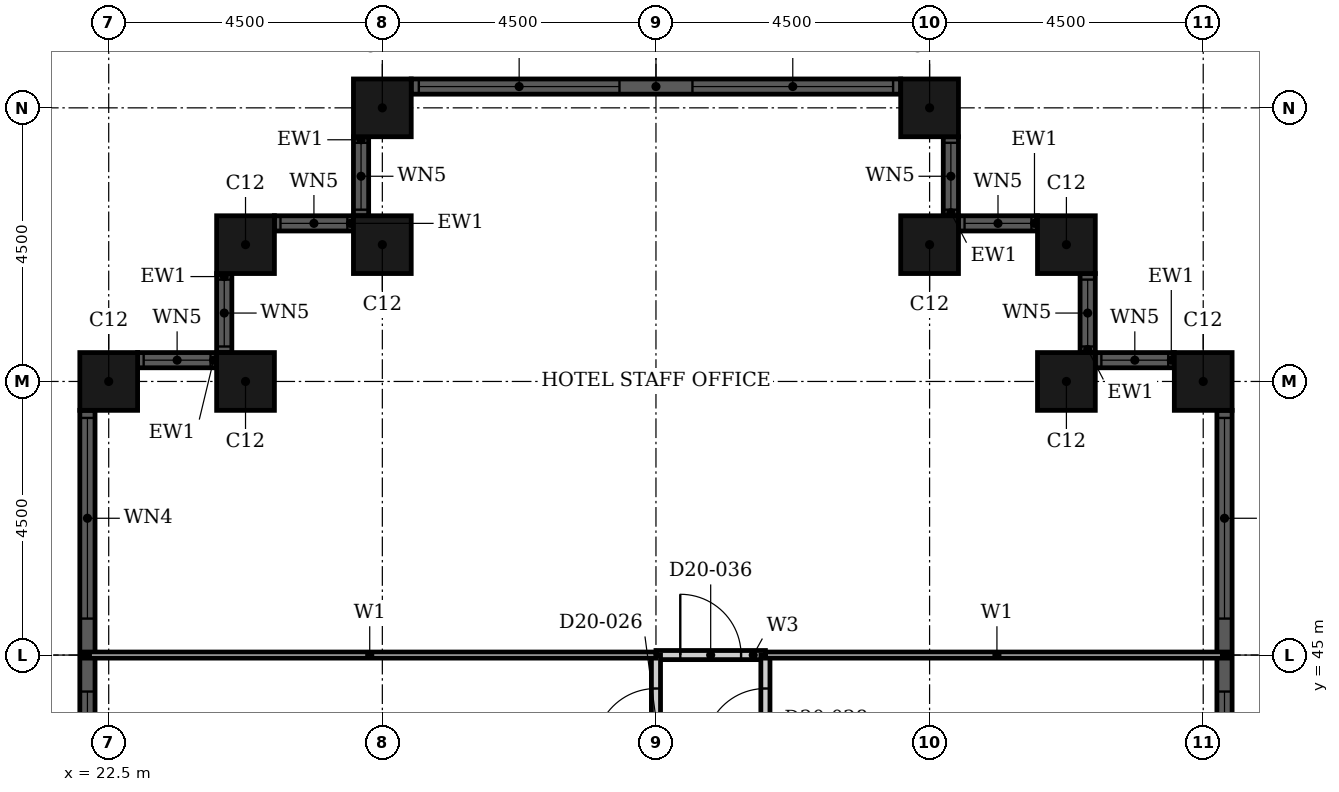
"""IFC4 building model, lengths in metres.
Left out: names, types, materials, properties, quantities, classifications, styles, units other than length and angle.
Written with IfcOpenShell. Run it as: python <this file> out.ifc"""

import sys

from ifc_helpers import new_model, si_unit, direction, frame, frame_2d, origin, origin_2d, place, context, subcontext, project, spatial, rectangle, hollow_rectangle, extrude, element, fill, save


model = new_model("IFC4")
c1 = context("Model", 3, precision=1e-05, world=origin(), true_north=direction((0.0, 1.0)))
c2 = subcontext(c1, "Body", "Model", "MODEL_VIEW")
j1 = project(units=[si_unit("LENGTHUNIT", "METRE"), si_unit("PLANEANGLEUNIT", "RADIAN")], contexts=[c1])
p1 = place(None, origin())
s1 = spatial("IfcSite", under=j1, at=p1, CompositionType="ELEMENT")
p2 = place(p1, origin())
s2 = spatial("IfcBuilding", under=s1, at=p2, CompositionType="ELEMENT")
p3 = place(p2, frame((0.0, 0.0, 85.2)))
s3 = spatial("IfcBuildingStorey", under=s2, at=p3, CompositionType="ELEMENT", Elevation=85.2)
for number, where, z_axis, x_axis in (
    (1, (40.5, 49.5, 0.0), (0.0, 0.0, 1.0), (1.0, 0.0, 0.0)),
    (2, (38.25, 49.5, 0.0), (0.0, 0.0, 1.0), (1.0, 0.0, 0.0)),
    (3, (38.25, 51.75, 0.0), (0.0, 0.0, 1.0), (1.0, 0.0, 0.0)),
    (4, (36.0, 51.75, 0.0), (0.0, 0.0, 1.0), (1.0, 0.0, 0.0)),
    (5, (36.0, 54.0, 0.0), (0.0, 0.0, 1.0), (1.0, 0.0, 0.0)),
    (6, (27.0, 54.0, 0.0), (0.0, 0.0, 1.0), (1.0, 0.0, 0.0)),
    (7, (27.0, 51.75, 0.0), (0.0, 0.0, 1.0), (1.0, 0.0, 0.0)),
    (8, (24.75, 51.75, 0.0), (0.0, 0.0, 1.0), (1.0, 0.0, 0.0)),
    (9, (24.75, 49.5, 0.0), (0.0, 0.0, 1.0), (1.0, 0.0, 0.0)),
    (10, (22.5, 49.5, 0.0), (0.0, 0.0, 1.0), (1.0, 0.0, 0.0)),
):
    element("IfcColumn", number, at=place(p3, frame(where, z_axis=z_axis, x_axis=x_axis)), inside=s3, PredefinedType="COLUMN", context=c2, shape_type="SweptSolid", body=[
        extrude(hollow_rectangle(XDim=0.95, YDim=0.95, WallThickness=0.03, at=origin_2d()), origin(), (0.0, 0.0, 1.0), 3.6),
    ])
p4 = place(p3, frame((40.85, 40.975, 0.0), z_axis=(0.0, 0.0, 1.0), x_axis=(0.0, 1.0, 0.0)))
e11 = element("IfcWall", 11, at=p4, inside=s3, PredefinedType="SOLIDWALL", context=c2, shape_type="SweptSolid", body=[
    extrude(rectangle(XDim=8.05, YDim=0.25, at=frame_2d((4.025, 0.0))), origin(), (0.0, 0.0, 1.0), 3.6),
])
p5 = place(p4, frame((0.125, 0.0, 0.9)))
e12 = element("IfcOpeningElement", 12, at=p5, cuts=e11, PredefinedType="OPENING", context=c2, shape_type="SweptSolid", body=[
    extrude(rectangle(XDim=3.3, YDim=2.08, at=frame_2d((1.65, 1.04))), frame((0.0, 0.135, 0.0), z_axis=(0.0, -1.0, 0.0), x_axis=(1.0, 0.0, 0.0)), (0.0, 0.0, 1.0), 0.27),
])
p6 = place(p4, frame((4.625, 0.0, 0.9)))
e13 = element("IfcOpeningElement", 13, at=p6, cuts=e11, PredefinedType="OPENING", context=c2, shape_type="SweptSolid", body=[
    extrude(rectangle(XDim=3.3, YDim=2.08, at=frame_2d((1.65, 1.04))), frame((0.0, 0.135, 0.0), z_axis=(0.0, -1.0, 0.0), x_axis=(1.0, 0.0, 0.0)), (0.0, 0.0, 1.0), 0.27),
])
p7 = place(p3, frame((40.025, 49.85, 0.0), z_axis=(0.0, 0.0, 1.0), x_axis=(-1.0, 0.0, 0.0)))
e14 = element("IfcWall", 14, at=p7, inside=s3, PredefinedType="SOLIDWALL", context=c2, shape_type="SweptSolid", body=[
    extrude(rectangle(XDim=1.3, YDim=0.25, at=frame_2d((0.65, 0.0))), origin(), (0.0, 0.0, 1.0), 3.6),
])
p8 = place(p7, frame((0.1, 0.0, 0.9)))
e15 = element("IfcOpeningElement", 15, at=p8, cuts=e14, PredefinedType="OPENING", context=c2, shape_type="SweptSolid", body=[
    extrude(rectangle(XDim=1.1, YDim=2.08, at=frame_2d((0.55, 1.04))), frame((0.0, 0.135, 0.0), z_axis=(0.0, -1.0, 0.0), x_axis=(1.0, 0.0, 0.0)), (0.0, 0.0, 1.0), 0.27),
])
p9 = place(p3, frame((38.6, 49.975, 0.0), z_axis=(0.0, 0.0, 1.0), x_axis=(0.0, 1.0, 0.0)))
e16 = element("IfcWall", 16, at=p9, inside=s3, PredefinedType="SOLIDWALL", context=c2, shape_type="SweptSolid", body=[
    extrude(rectangle(XDim=1.3, YDim=0.25, at=frame_2d((0.65, 0.0))), origin(), (0.0, 0.0, 1.0), 3.6),
])
p10 = place(p9, frame((0.1, 0.0, 0.9)))
e17 = element("IfcOpeningElement", 17, at=p10, cuts=e16, PredefinedType="OPENING", context=c2, shape_type="SweptSolid", body=[
    extrude(rectangle(XDim=1.1, YDim=2.08, at=frame_2d((0.55, 1.04))), frame((0.0, 0.135, 0.0), z_axis=(0.0, -1.0, 0.0), x_axis=(1.0, 0.0, 0.0)), (0.0, 0.0, 1.0), 0.27),
])
p11 = place(p3, frame((37.775, 52.1, 0.0), z_axis=(0.0, 0.0, 1.0), x_axis=(-1.0, 0.0, 0.0)))
e18 = element("IfcWall", 18, at=p11, inside=s3, PredefinedType="SOLIDWALL", context=c2, shape_type="SweptSolid", body=[
    extrude(rectangle(XDim=1.3, YDim=0.25, at=frame_2d((0.65, 0.0))), origin(), (0.0, 0.0, 1.0), 3.6),
])
p12 = place(p11, frame((0.1, 0.0, 0.9)))
e19 = element("IfcOpeningElement", 19, at=p12, cuts=e18, PredefinedType="OPENING", context=c2, shape_type="SweptSolid", body=[
    extrude(rectangle(XDim=1.1, YDim=2.08, at=frame_2d((0.55, 1.04))), frame((0.0, 0.135, 0.0), z_axis=(0.0, -1.0, 0.0), x_axis=(1.0, 0.0, 0.0)), (0.0, 0.0, 1.0), 0.27),
])
p13 = place(p3, frame((36.35, 52.225, 0.0), z_axis=(0.0, 0.0, 1.0), x_axis=(0.0, 1.0, 0.0)))
e20 = element("IfcWall", 20, at=p13, inside=s3, PredefinedType="SOLIDWALL", context=c2, shape_type="SweptSolid", body=[
    extrude(rectangle(XDim=1.3, YDim=0.25, at=frame_2d((0.65, 0.0))), origin(), (0.0, 0.0, 1.0), 3.6),
])
p14 = place(p13, frame((0.1, 0.0, 0.9)))
e21 = element("IfcOpeningElement", 21, at=p14, cuts=e20, PredefinedType="OPENING", context=c2, shape_type="SweptSolid", body=[
    extrude(rectangle(XDim=1.1, YDim=2.08, at=frame_2d((0.55, 1.04))), frame((0.0, 0.135, 0.0), z_axis=(0.0, -1.0, 0.0), x_axis=(1.0, 0.0, 0.0)), (0.0, 0.0, 1.0), 0.27),
])
p15 = place(p3, frame((35.525, 54.35, 0.0), z_axis=(0.0, 0.0, 1.0), x_axis=(-1.0, 0.0, 0.0)))
e22 = element("IfcWall", 22, at=p15, inside=s3, PredefinedType="SOLIDWALL", context=c2, shape_type="SweptSolid", body=[
    extrude(rectangle(XDim=8.05, YDim=0.25, at=frame_2d((4.025, 0.0))), origin(), (0.0, 0.0, 1.0), 3.6),
])
p16 = place(p15, frame((0.125, 0.0, 0.9)))
e23 = element("IfcOpeningElement", 23, at=p16, cuts=e22, PredefinedType="OPENING", context=c2, shape_type="SweptSolid", body=[
    extrude(rectangle(XDim=3.3, YDim=2.08, at=frame_2d((1.65, 1.04))), frame((0.0, 0.135, 0.0), z_axis=(0.0, -1.0, 0.0), x_axis=(1.0, 0.0, 0.0)), (0.0, 0.0, 1.0), 0.27),
])
p17 = place(p15, frame((4.625, 0.0, 0.9)))
e24 = element("IfcOpeningElement", 24, at=p17, cuts=e22, PredefinedType="OPENING", context=c2, shape_type="SweptSolid", body=[
    extrude(rectangle(XDim=3.3, YDim=2.08, at=frame_2d((1.65, 1.04))), frame((0.0, 0.135, 0.0), z_axis=(0.0, -1.0, 0.0), x_axis=(1.0, 0.0, 0.0)), (0.0, 0.0, 1.0), 0.27),
])
p18 = place(p3, frame((26.65, 53.525, 0.0), z_axis=(0.0, 0.0, 1.0), x_axis=(0.0, -1.0, 0.0)))
e25 = element("IfcWall", 25, at=p18, inside=s3, PredefinedType="SOLIDWALL", context=c2, shape_type="SweptSolid", body=[
    extrude(rectangle(XDim=1.3, YDim=0.25, at=frame_2d((0.65, 0.0))), origin(), (0.0, 0.0, 1.0), 3.6),
])
p19 = place(p18, frame((0.1, 0.0, 0.9)))
e26 = element("IfcOpeningElement", 26, at=p19, cuts=e25, PredefinedType="OPENING", context=c2, shape_type="SweptSolid", body=[
    extrude(rectangle(XDim=1.1, YDim=2.08, at=frame_2d((0.55, 1.04))), frame((0.0, 0.135, 0.0), z_axis=(0.0, -1.0, 0.0), x_axis=(1.0, 0.0, 0.0)), (0.0, 0.0, 1.0), 0.27),
])
p20 = place(p3, frame((26.525, 52.1, 0.0), z_axis=(0.0, 0.0, 1.0), x_axis=(-1.0, 0.0, 0.0)))
e27 = element("IfcWall", 27, at=p20, inside=s3, PredefinedType="SOLIDWALL", context=c2, shape_type="SweptSolid", body=[
    extrude(rectangle(XDim=1.3, YDim=0.25, at=frame_2d((0.65, 0.0))), origin(), (0.0, 0.0, 1.0), 3.6),
])
p21 = place(p20, frame((0.1, 0.0, 0.9)))
e28 = element("IfcOpeningElement", 28, at=p21, cuts=e27, PredefinedType="OPENING", context=c2, shape_type="SweptSolid", body=[
    extrude(rectangle(XDim=1.1, YDim=2.08, at=frame_2d((0.55, 1.04))), frame((0.0, 0.135, 0.0), z_axis=(0.0, -1.0, 0.0), x_axis=(1.0, 0.0, 0.0)), (0.0, 0.0, 1.0), 0.27),
])
p22 = place(p3, frame((24.4, 51.275, 0.0), z_axis=(0.0, 0.0, 1.0), x_axis=(0.0, -1.0, 0.0)))
e29 = element("IfcWall", 29, at=p22, inside=s3, PredefinedType="SOLIDWALL", context=c2, shape_type="SweptSolid", body=[
    extrude(rectangle(XDim=1.3, YDim=0.25, at=frame_2d((0.65, 0.0))), origin(), (0.0, 0.0, 1.0), 3.6),
])
p23 = place(p22, frame((0.1, 0.0, 0.9)))
e30 = element("IfcOpeningElement", 30, at=p23, cuts=e29, PredefinedType="OPENING", context=c2, shape_type="SweptSolid", body=[
    extrude(rectangle(XDim=1.1, YDim=2.08, at=frame_2d((0.55, 1.04))), frame((0.0, 0.135, 0.0), z_axis=(0.0, -1.0, 0.0), x_axis=(1.0, 0.0, 0.0)), (0.0, 0.0, 1.0), 0.27),
])
p24 = place(p3, frame((24.275, 49.85, 0.0), z_axis=(0.0, 0.0, 1.0), x_axis=(-1.0, 0.0, 0.0)))
e31 = element("IfcWall", 31, at=p24, inside=s3, PredefinedType="SOLIDWALL", context=c2, shape_type="SweptSolid", body=[
    extrude(rectangle(XDim=1.3, YDim=0.25, at=frame_2d((0.65, 0.0))), origin(), (0.0, 0.0, 1.0), 3.6),
])
p25 = place(p24, frame((0.1, 0.0, 0.9)))
e32 = element("IfcOpeningElement", 32, at=p25, cuts=e31, PredefinedType="OPENING", context=c2, shape_type="SweptSolid", body=[
    extrude(rectangle(XDim=1.1, YDim=2.08, at=frame_2d((0.55, 1.04))), frame((0.0, 0.135, 0.0), z_axis=(0.0, -1.0, 0.0), x_axis=(1.0, 0.0, 0.0)), (0.0, 0.0, 1.0), 0.27),
])
p26 = place(p3, frame((22.15, 49.025, 0.0), z_axis=(0.0, 0.0, 1.0), x_axis=(0.0, -1.0, 0.0)))
e33 = element("IfcWall", 33, at=p26, inside=s3, PredefinedType="SOLIDWALL", context=c2, shape_type="SweptSolid", body=[
    extrude(rectangle(XDim=8.05, YDim=0.25, at=frame_2d((4.025, 0.0))), origin(), (0.0, 0.0, 1.0), 3.6),
])
p27 = place(p26, frame((0.125, 0.0, 0.9)))
e34 = element("IfcOpeningElement", 34, at=p27, cuts=e33, PredefinedType="OPENING", context=c2, shape_type="SweptSolid", body=[
    extrude(rectangle(XDim=3.3, YDim=2.08, at=frame_2d((1.65, 1.04))), frame((0.0, 0.135, 0.0), z_axis=(0.0, -1.0, 0.0), x_axis=(1.0, 0.0, 0.0)), (0.0, 0.0, 1.0), 0.27),
])
p28 = place(p26, frame((4.625, 0.0, 0.9)))
e35 = element("IfcOpeningElement", 35, at=p28, cuts=e33, PredefinedType="OPENING", context=c2, shape_type="SweptSolid", body=[
    extrude(rectangle(XDim=3.3, YDim=2.08, at=frame_2d((1.65, 1.04))), frame((0.0, 0.135, 0.0), z_axis=(0.0, -1.0, 0.0), x_axis=(1.0, 0.0, 0.0)), (0.0, 0.0, 1.0), 0.27),
])
p29 = place(p3, frame((31.5, 45.0, 0.0), z_axis=(0.0, 0.0, 1.0), x_axis=(1.0, 0.0, 0.0)))
e36 = element("IfcWall", 36, at=p29, inside=s3, PredefinedType="PARTITIONING", context=c2, shape_type="SweptSolid", body=[
    extrude(rectangle(XDim=1.8, YDim=0.15, at=frame_2d((0.9, 0.0))), origin(), (0.0, 0.0, 1.0), 3.3),
])
p30 = place(p29, frame((0.4, 0.0, 0.0)))
e37 = element("IfcOpeningElement", 37, at=p30, cuts=e36, PredefinedType="OPENING", context=c2, shape_type="SweptSolid", body=[
    extrude(rectangle(XDim=1.0, YDim=2.1, at=frame_2d((0.5, 1.05))), frame((0.0, 0.085, 0.0), z_axis=(0.0, -1.0, 0.0), x_axis=(1.0, 0.0, 0.0)), (0.0, 0.0, 1.0), 0.17),
])
p31 = place(p3, frame((31.5, 33.3, 0.0), z_axis=(0.0, 0.0, 1.0), x_axis=(0.0, 1.0, 0.0)))
e38 = element("IfcWall", 38, at=p31, inside=s3, PredefinedType="PARTITIONING", context=c2, shape_type="SweptSolid", body=[
    extrude(rectangle(XDim=11.7, YDim=0.15, at=frame_2d((5.85, 0.0))), origin(), (0.0, 0.0, 1.0), 2.58),
])
p32 = place(p31, frame((10.15, 0.0, 0.0)))
e39 = element("IfcOpeningElement", 39, at=p32, cuts=e38, PredefinedType="OPENING", context=c2, shape_type="SweptSolid", body=[
    extrude(rectangle(XDim=1.0, YDim=2.1, at=frame_2d((0.5, 1.05))), frame((0.0, 0.085, 0.0), z_axis=(0.0, -1.0, 0.0), x_axis=(1.0, 0.0, 0.0)), (0.0, 0.0, 1.0), 0.17),
])
p33 = place(p3, frame((33.3, 33.3, 0.0), z_axis=(0.0, 0.0, 1.0), x_axis=(0.0, 1.0, 0.0)))
e40 = element("IfcWall", 40, at=p33, inside=s3, PredefinedType="PARTITIONING", context=c2, shape_type="SweptSolid", body=[
    extrude(rectangle(XDim=11.7, YDim=0.15, at=frame_2d((5.85, 0.0))), origin(), (0.0, 0.0, 1.0), 3.3),
])
p34 = place(p33, frame((10.15, 0.0, 0.0)))
e41 = element("IfcOpeningElement", 41, at=p34, cuts=e40, PredefinedType="OPENING", context=c2, shape_type="SweptSolid", body=[
    extrude(rectangle(XDim=1.0, YDim=2.1, at=frame_2d((0.5, 1.05))), frame((0.0, 0.085, 0.0), z_axis=(0.0, -1.0, 0.0), x_axis=(1.0, 0.0, 0.0)), (0.0, 0.0, 1.0), 0.17),
])
p35 = place(p3, frame((33.3, 45.0, 0.0), z_axis=(0.0, 0.0, 1.0), x_axis=(1.0, 0.0, 0.0)))
e42 = element("IfcWall", 42, at=p35, inside=s3, PredefinedType="PARTITIONING", context=c2, shape_type="SweptSolid", body=[
    extrude(rectangle(XDim=7.615, YDim=0.1, at=frame_2d((3.808, 0.0))), origin(), (0.0, 0.0, 1.0), 3.3),
])
p36 = place(p3, frame((22.085, 45.0, 0.0), z_axis=(0.0, 0.0, 1.0), x_axis=(1.0, 0.0, 0.0)))
e43 = element("IfcWall", 43, at=p36, inside=s3, PredefinedType="PARTITIONING", context=c2, shape_type="SweptSolid", body=[
    extrude(rectangle(XDim=9.415, YDim=0.1, at=frame_2d((4.708, 0.0))), origin(), (0.0, 0.0, 1.0), 3.3),
])
p37 = place(p5, origin())
e44 = element("IfcWindow", 44, at=p37, inside=s3, PartitioningType="SINGLE_PANEL", PredefinedType="WINDOW", context=c2, shape_type="SweptSolid", body=[
    extrude(rectangle(XDim=3.3, YDim=2.08, at=frame_2d((1.65, 1.04))), frame((0.0, 0.03, 0.0), z_axis=(0.0, -1.0, 0.0), x_axis=(1.0, 0.0, 0.0)), (0.0, 0.0, 1.0), 0.06),
])
fill(e12, e44)
p38 = place(p6, origin())
e45 = element("IfcWindow", 45, at=p38, inside=s3, PartitioningType="SINGLE_PANEL", PredefinedType="WINDOW", context=c2, shape_type="SweptSolid", body=[
    extrude(rectangle(XDim=3.3, YDim=2.08, at=frame_2d((1.65, 1.04))), frame((0.0, 0.03, 0.0), z_axis=(0.0, -1.0, 0.0), x_axis=(1.0, 0.0, 0.0)), (0.0, 0.0, 1.0), 0.06),
])
fill(e13, e45)
p39 = place(p8, origin())
e46 = element("IfcWindow", 46, at=p39, inside=s3, PartitioningType="SINGLE_PANEL", PredefinedType="WINDOW", context=c2, shape_type="SweptSolid", body=[
    extrude(rectangle(XDim=1.1, YDim=2.08, at=frame_2d((0.55, 1.04))), frame((0.0, 0.03, 0.0), z_axis=(0.0, -1.0, 0.0), x_axis=(1.0, 0.0, 0.0)), (0.0, 0.0, 1.0), 0.06),
])
fill(e15, e46)
p40 = place(p10, origin())
e47 = element("IfcWindow", 47, at=p40, inside=s3, PartitioningType="SINGLE_PANEL", PredefinedType="WINDOW", context=c2, shape_type="SweptSolid", body=[
    extrude(rectangle(XDim=1.1, YDim=2.08, at=frame_2d((0.55, 1.04))), frame((0.0, 0.03, 0.0), z_axis=(0.0, -1.0, 0.0), x_axis=(1.0, 0.0, 0.0)), (0.0, 0.0, 1.0), 0.06),
])
fill(e17, e47)
p41 = place(p12, origin())
e48 = element("IfcWindow", 48, at=p41, inside=s3, PartitioningType="SINGLE_PANEL", PredefinedType="WINDOW", context=c2, shape_type="SweptSolid", body=[
    extrude(rectangle(XDim=1.1, YDim=2.08, at=frame_2d((0.55, 1.04))), frame((0.0, 0.03, 0.0), z_axis=(0.0, -1.0, 0.0), x_axis=(1.0, 0.0, 0.0)), (0.0, 0.0, 1.0), 0.06),
])
fill(e19, e48)
p42 = place(p14, origin())
e49 = element("IfcWindow", 49, at=p42, inside=s3, PartitioningType="SINGLE_PANEL", PredefinedType="WINDOW", context=c2, shape_type="SweptSolid", body=[
    extrude(rectangle(XDim=1.1, YDim=2.08, at=frame_2d((0.55, 1.04))), frame((0.0, 0.03, 0.0), z_axis=(0.0, -1.0, 0.0), x_axis=(1.0, 0.0, 0.0)), (0.0, 0.0, 1.0), 0.06),
])
fill(e21, e49)
p43 = place(p16, origin())
e50 = element("IfcWindow", 50, at=p43, inside=s3, PartitioningType="SINGLE_PANEL", PredefinedType="WINDOW", context=c2, shape_type="SweptSolid", body=[
    extrude(rectangle(XDim=3.3, YDim=2.08, at=frame_2d((1.65, 1.04))), frame((0.0, 0.03, 0.0), z_axis=(0.0, -1.0, 0.0), x_axis=(1.0, 0.0, 0.0)), (0.0, 0.0, 1.0), 0.06),
])
fill(e23, e50)
p44 = place(p17, origin())
e51 = element("IfcWindow", 51, at=p44, inside=s3, PartitioningType="SINGLE_PANEL", PredefinedType="WINDOW", context=c2, shape_type="SweptSolid", body=[
    extrude(rectangle(XDim=3.3, YDim=2.08, at=frame_2d((1.65, 1.04))), frame((0.0, 0.03, 0.0), z_axis=(0.0, -1.0, 0.0), x_axis=(1.0, 0.0, 0.0)), (0.0, 0.0, 1.0), 0.06),
])
fill(e24, e51)
p45 = place(p19, origin())
e52 = element("IfcWindow", 52, at=p45, inside=s3, PartitioningType="SINGLE_PANEL", PredefinedType="WINDOW", context=c2, shape_type="SweptSolid", body=[
    extrude(rectangle(XDim=1.1, YDim=2.08, at=frame_2d((0.55, 1.04))), frame((0.0, 0.03, 0.0), z_axis=(0.0, -1.0, 0.0), x_axis=(1.0, 0.0, 0.0)), (0.0, 0.0, 1.0), 0.06),
])
fill(e26, e52)
p46 = place(p21, origin())
e53 = element("IfcWindow", 53, at=p46, inside=s3, PartitioningType="SINGLE_PANEL", PredefinedType="WINDOW", context=c2, shape_type="SweptSolid", body=[
    extrude(rectangle(XDim=1.1, YDim=2.08, at=frame_2d((0.55, 1.04))), frame((0.0, 0.03, 0.0), z_axis=(0.0, -1.0, 0.0), x_axis=(1.0, 0.0, 0.0)), (0.0, 0.0, 1.0), 0.06),
])
fill(e28, e53)
p47 = place(p23, origin())
e54 = element("IfcWindow", 54, at=p47, inside=s3, PartitioningType="SINGLE_PANEL", PredefinedType="WINDOW", context=c2, shape_type="SweptSolid", body=[
    extrude(rectangle(XDim=1.1, YDim=2.08, at=frame_2d((0.55, 1.04))), frame((0.0, 0.03, 0.0), z_axis=(0.0, -1.0, 0.0), x_axis=(1.0, 0.0, 0.0)), (0.0, 0.0, 1.0), 0.06),
])
fill(e30, e54)
p48 = place(p25, origin())
e55 = element("IfcWindow", 55, at=p48, inside=s3, PartitioningType="SINGLE_PANEL", PredefinedType="WINDOW", context=c2, shape_type="SweptSolid", body=[
    extrude(rectangle(XDim=1.1, YDim=2.08, at=frame_2d((0.55, 1.04))), frame((0.0, 0.03, 0.0), z_axis=(0.0, -1.0, 0.0), x_axis=(1.0, 0.0, 0.0)), (0.0, 0.0, 1.0), 0.06),
])
fill(e32, e55)
p49 = place(p27, origin())
e56 = element("IfcWindow", 56, at=p49, inside=s3, PartitioningType="SINGLE_PANEL", PredefinedType="WINDOW", context=c2, shape_type="SweptSolid", body=[
    extrude(rectangle(XDim=3.3, YDim=2.08, at=frame_2d((1.65, 1.04))), frame((0.0, 0.03, 0.0), z_axis=(0.0, -1.0, 0.0), x_axis=(1.0, 0.0, 0.0)), (0.0, 0.0, 1.0), 0.06),
])
fill(e34, e56)
p50 = place(p28, origin())
e57 = element("IfcWindow", 57, at=p50, inside=s3, PartitioningType="SINGLE_PANEL", PredefinedType="WINDOW", context=c2, shape_type="SweptSolid", body=[
    extrude(rectangle(XDim=3.3, YDim=2.08, at=frame_2d((1.65, 1.04))), frame((0.0, 0.03, 0.0), z_axis=(0.0, -1.0, 0.0), x_axis=(1.0, 0.0, 0.0)), (0.0, 0.0, 1.0), 0.06),
])
fill(e35, e57)
p51 = place(p32, origin())
e58 = element("IfcDoor", 58, at=p51, inside=s3, OperationType="SINGLE_SWING_RIGHT", PredefinedType="DOOR", context=c2, shape_type="SweptSolid", body=[
    extrude(rectangle(XDim=1.0, YDim=2.1, at=frame_2d((0.5, 1.05))), frame((0.0, 0.025, 0.0), z_axis=(0.0, -1.0, 0.0), x_axis=(1.0, 0.0, 0.0)), (0.0, 0.0, 1.0), 0.05),
])
fill(e39, e58)
p52 = place(p34, origin())
e59 = element("IfcDoor", 59, at=p52, inside=s3, OperationType="SINGLE_SWING_RIGHT", PredefinedType="DOOR", context=c2, shape_type="SweptSolid", body=[
    extrude(rectangle(XDim=1.0, YDim=2.1, at=frame_2d((0.5, 1.05))), frame((0.0, 0.025, 0.0), z_axis=(0.0, -1.0, 0.0), x_axis=(1.0, 0.0, 0.0)), (0.0, 0.0, 1.0), 0.05),
])
fill(e41, e59)
p53 = place(p30, origin())
e60 = element("IfcDoor", 60, at=p53, inside=s3, OperationType="SINGLE_SWING_RIGHT", PredefinedType="DOOR", context=c2, shape_type="SweptSolid", body=[
    extrude(rectangle(XDim=1.0, YDim=2.1, at=frame_2d((0.5, 1.05))), frame((0.0, 0.025, 0.0), z_axis=(0.0, -1.0, 0.0), x_axis=(1.0, 0.0, 0.0)), (0.0, 0.0, 1.0), 0.05),
])
fill(e37, e60)
save(model, sys.argv[1])
